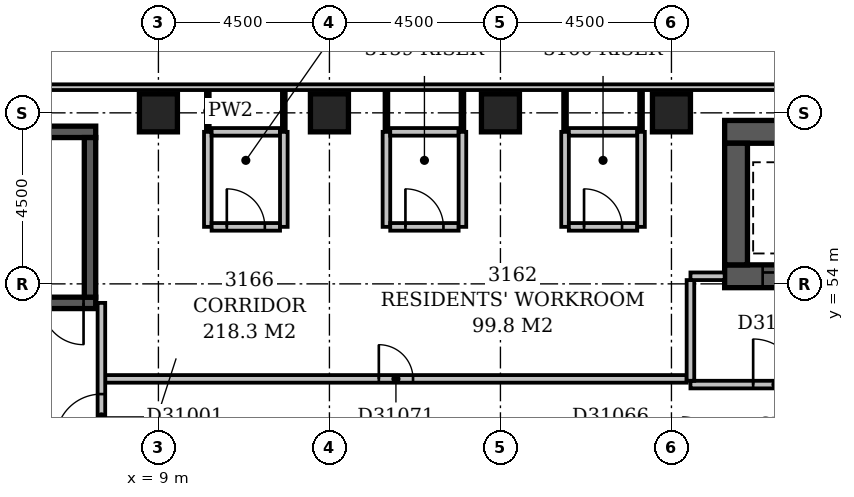
"""IFC4 building model, lengths in metres.
Left out: names, types, materials, properties, quantities, classifications, styles, units other than length and angle.
Written with IfcOpenShell. Run it as: python <this file> out.ifc"""

import sys

from ifc_helpers import new_model, si_unit, direction, frame, frame_2d, origin, origin_2d, place, context, subcontext, project, spatial, rectangle, extrude, element, fill, save


model = new_model("IFC4")
c1 = context("Model", 3, precision=1e-05, world=origin(), true_north=direction((0.0, 1.0)))
c2 = subcontext(c1, "Body", "Model", "MODEL_VIEW")
j1 = project(units=[si_unit("LENGTHUNIT", "METRE"), si_unit("PLANEANGLEUNIT", "RADIAN")], contexts=[c1])
p1 = place(None, origin())
s1 = spatial("IfcSite", under=j1, at=p1, CompositionType="ELEMENT")
p2 = place(p1, origin())
s2 = spatial("IfcBuilding", under=s1, at=p2, CompositionType="ELEMENT")
p3 = place(p2, frame((0.0, 0.0, 126.8)))
s3 = spatial("IfcBuildingStorey", under=s2, at=p3, CompositionType="ELEMENT", Elevation=126.8)
p4 = place(p3, frame((0.35, 53.5, -0.3), z_axis=(0.0, 0.0, 1.0), x_axis=(1.0, 0.0, 0.0)))
e1 = element("IfcWall", 1, at=p4, inside=s3, PredefinedType="SHEAR", context=c2, shape_type="SweptSolid", body=[
    extrude(rectangle(XDim=7.0, YDim=0.3, at=frame_2d((3.5, 0.0))), origin(), (0.0, 0.0, 1.0), 3.6),
])
p5 = place(p4, frame((5.58, 0.0, 0.3)))
e2 = element("IfcOpeningElement", 2, at=p5, cuts=e1, PredefinedType="OPENING", context=c2, shape_type="SweptSolid", body=[
    extrude(rectangle(XDim=1.1, YDim=2.1, at=frame_2d((0.55, 1.05))), frame((0.0, 0.162, 0.0), z_axis=(0.0, -1.0, 0.0), x_axis=(1.0, 0.0, 0.0)), (0.0, 0.0, 1.0), 0.324),
])
p6 = place(p3, frame((0.35, 58.0, -0.3), z_axis=(0.0, 0.0, 1.0), x_axis=(1.0, 0.0, 0.0)))
e3 = element("IfcWall", 3, at=p6, inside=s3, PredefinedType="SHEAR", context=c2, shape_type="SweptSolid", body=[
    extrude(rectangle(XDim=7.0, YDim=0.3, at=frame_2d((3.5, 0.0))), origin(), (0.0, 0.0, 1.0), 3.6),
])
p7 = place(p3, frame((7.2, 53.65, -0.3), z_axis=(0.0, 0.0, 1.0), x_axis=(0.0, 1.0, 0.0)))
e4 = element("IfcWall", 4, at=p7, inside=s3, PredefinedType="SHEAR", context=c2, shape_type="SweptSolid", body=[
    extrude(rectangle(XDim=4.2, YDim=0.3, at=frame_2d((2.1, 0.0))), origin(), (0.0, 0.0, 1.0), 3.6),
])
p8 = place(p3, frame((23.9, 54.2, -0.3), z_axis=(0.0, 0.0, 1.0), x_axis=(1.0, 0.0, 0.0)))
e5 = element("IfcWall", 5, at=p8, inside=s3, PredefinedType="SHEAR", context=c2, shape_type="SweptSolid", body=[
    extrude(rectangle(XDim=3.1, YDim=0.6, at=frame_2d((1.55, 0.0))), origin(), (0.0, 0.0, 1.0), 3.6),
])
p9 = place(p8, frame((1.0, 0.0, 0.3)))
e6 = element("IfcOpeningElement", 6, at=p9, cuts=e5, PredefinedType="OPENING", context=c2, shape_type="SweptSolid", body=[
    extrude(rectangle(XDim=1.1, YDim=2.1, at=frame_2d((0.55, 1.05))), frame((0.0, 0.312, 0.0), z_axis=(0.0, -1.0, 0.0), x_axis=(1.0, 0.0, 0.0)), (0.0, 0.0, 1.0), 0.624),
])
p10 = place(p3, frame((23.9, 58.0, -0.3), z_axis=(0.0, 0.0, 1.0), x_axis=(1.0, 0.0, 0.0)))
e7 = element("IfcWall", 7, at=p10, inside=s3, PredefinedType="SHEAR", context=c2, shape_type="SweptSolid", body=[
    extrude(rectangle(XDim=3.1, YDim=0.6, at=frame_2d((1.55, 0.0))), origin(), (0.0, 0.0, 1.0), 3.6),
])
p11 = place(p3, frame((24.2, 54.5, -0.3), z_axis=(0.0, 0.0, 1.0), x_axis=(0.0, 1.0, 0.0)))
e8 = element("IfcWall", 8, at=p11, inside=s3, PredefinedType="SHEAR", context=c2, shape_type="SweptSolid", body=[
    extrude(rectangle(XDim=3.2, YDim=0.6, at=frame_2d((1.6, 0.0))), origin(), (0.0, 0.0, 1.0), 3.6),
])
for number, where, z_axis, x_axis in (
    (9, (9.0, 58.5, -0.3), (0.0, 0.0, 1.0), (1.0, 0.0, 0.0)),
    (10, (13.5, 58.5, -0.3), (0.0, 0.0, 1.0), (1.0, 0.0, 0.0)),
    (11, (18.0, 58.5, -0.3), (0.0, 0.0, 1.0), (1.0, 0.0, 0.0)),
    (12, (22.5, 58.5, -0.3), (0.0, 0.0, 1.0), (1.0, 0.0, 0.0)),
):
    element("IfcColumn", number, at=place(p3, frame(where, z_axis=z_axis, x_axis=x_axis)), inside=s3, PredefinedType="COLUMN", context=c2, shape_type="SweptSolid", body=[
        extrude(rectangle(XDim=1.0, YDim=1.0, at=origin_2d()), origin(), (0.0, 0.0, 1.0), 3.6),
    ])
p12 = place(p3, frame((68.1, 59.175, 0.0), z_axis=(0.0, 0.0, 1.0), x_axis=(-1.0, 0.0, 0.0)))
e13 = element("IfcWall", 13, at=p12, inside=s3, PredefinedType="STANDARD", context=c2, shape_type="SweptSolid", body=[
    extrude(rectangle(XDim=68.85, YDim=0.15, at=frame_2d((34.425, 0.0))), origin(), (0.0, 0.0, 1.0), 2.7),
])
p13 = place(p12, frame((1.65, 0.0, 0.6)))
e14 = element("IfcOpeningElement", 14, at=p13, cuts=e13, PredefinedType="OPENING", context=c2, shape_type="SweptSolid", body=[
    extrude(rectangle(XDim=2.4, YDim=1.8, at=frame_2d((1.2, 0.9))), frame((0.0, 0.087, 0.0), z_axis=(0.0, -1.0, 0.0), x_axis=(1.0, 0.0, 0.0)), (0.0, 0.0, 1.0), 0.174),
])
p14 = place(p12, frame((5.854, 0.0, 0.6)))
e15 = element("IfcOpeningElement", 15, at=p14, cuts=e13, PredefinedType="OPENING", context=c2, shape_type="SweptSolid", body=[
    extrude(rectangle(XDim=1.5, YDim=1.8, at=frame_2d((0.75, 0.9))), frame((0.0, 0.087, 0.0), z_axis=(0.0, -1.0, 0.0), x_axis=(1.0, 0.0, 0.0)), (0.0, 0.0, 1.0), 0.174),
])
p15 = place(p12, frame((15.15, 0.0, 0.6)))
e16 = element("IfcOpeningElement", 16, at=p15, cuts=e13, PredefinedType="OPENING", context=c2, shape_type="SweptSolid", body=[
    extrude(rectangle(XDim=2.4, YDim=1.8, at=frame_2d((1.2, 0.9))), frame((0.0, 0.087, 0.0), z_axis=(0.0, -1.0, 0.0), x_axis=(1.0, 0.0, 0.0)), (0.0, 0.0, 1.0), 0.174),
])
p16 = place(p12, frame((20.847, 0.0, 0.6)))
e17 = element("IfcOpeningElement", 17, at=p16, cuts=e13, PredefinedType="OPENING", context=c2, shape_type="SweptSolid", body=[
    extrude(rectangle(XDim=1.5, YDim=1.8, at=frame_2d((0.75, 0.9))), frame((0.0, 0.087, 0.0), z_axis=(0.0, -1.0, 0.0), x_axis=(1.0, 0.0, 0.0)), (0.0, 0.0, 1.0), 0.174),
])
p17 = place(p12, frame((37.65, 0.0, 0.6)))
e18 = element("IfcOpeningElement", 18, at=p17, cuts=e13, PredefinedType="OPENING", context=c2, shape_type="SweptSolid", body=[
    extrude(rectangle(XDim=2.4, YDim=1.8, at=frame_2d((1.2, 0.9))), frame((0.0, 0.087, 0.0), z_axis=(0.0, -1.0, 0.0), x_axis=(1.0, 0.0, 0.0)), (0.0, 0.0, 1.0), 0.174),
])
p18 = place(p3, frame((23.0, 51.35, 0.0), z_axis=(0.0, 0.0, 1.0), x_axis=(1.0, 0.0, 0.0)))
e19 = element("IfcWall", 19, at=p18, inside=s3, PredefinedType="PARTITIONING", context=c2, shape_type="SweptSolid", body=[
    extrude(rectangle(XDim=4.8, YDim=0.2, at=frame_2d((2.4, 0.0))), origin(), (0.0, 0.0, 1.0), 3.3),
])
p19 = place(p18, frame((1.65, 0.0, 0.0)))
e20 = element("IfcOpeningElement", 20, at=p19, cuts=e19, PredefinedType="OPENING", context=c2, shape_type="SweptSolid", body=[
    extrude(rectangle(XDim=1.2, YDim=2.1, at=frame_2d((0.6, 1.05))), frame((0.0, 0.112, 0.0), z_axis=(0.0, -1.0, 0.0), x_axis=(1.0, 0.0, 0.0)), (0.0, 0.0, 1.0), 0.224),
])
p20 = place(p3, frame((23.0, 54.2, 0.0), z_axis=(0.0, 0.0, 1.0), x_axis=(1.0, 0.0, 0.0)))
e21 = element("IfcWall", 21, at=p20, inside=s3, PredefinedType="PARTITIONING", context=c2, shape_type="SweptSolid", body=[
    extrude(rectangle(XDim=0.9, YDim=0.2, at=frame_2d((0.45, 0.0))), origin(), (0.0, 0.0, 1.0), 3.3),
])
p21 = place(p3, frame((23.0, 51.45, 0.0), z_axis=(0.0, 0.0, 1.0), x_axis=(0.0, 1.0, 0.0)))
e22 = element("IfcWall", 22, at=p21, inside=s3, PredefinedType="PARTITIONING", context=c2, shape_type="SweptSolid", body=[
    extrude(rectangle(XDim=2.65, YDim=0.2, at=frame_2d((1.325, 0.0))), origin(), (0.0, 0.0, 1.0), 3.3),
])
p22 = place(p3, frame((7.5, 49.6, 0.0), z_axis=(0.0, 0.0, 1.0), x_axis=(0.0, 1.0, 0.0)))
e23 = element("IfcWall", 23, at=p22, inside=s3, PredefinedType="PARTITIONING", context=c2, shape_type="SweptSolid", body=[
    extrude(rectangle(XDim=3.9, YDim=0.2, at=frame_2d((1.95, 0.0))), origin(), (0.0, 0.0, 1.0), 3.3),
])
p23 = place(p22, frame((0.3, 0.0, 0.0)))
e24 = element("IfcOpeningElement", 24, at=p23, cuts=e23, PredefinedType="OPENING", context=c2, shape_type="SweptSolid", body=[
    extrude(rectangle(XDim=1.2, YDim=2.1, at=frame_2d((0.6, 1.05))), frame((0.0, 0.112, 0.0), z_axis=(0.0, -1.0, 0.0), x_axis=(1.0, 0.0, 0.0)), (0.0, 0.0, 1.0), 0.224),
])
p24 = place(p3, frame((7.6, 51.5, 0.0), z_axis=(0.0, 0.0, 1.0), x_axis=(1.0, 0.0, 0.0)))
e25 = element("IfcWall", 25, at=p24, inside=s3, PredefinedType="PARTITIONING", context=c2, shape_type="SweptSolid", body=[
    extrude(rectangle(XDim=15.3, YDim=0.2, at=frame_2d((7.65, 0.0))), origin(), (0.0, 0.0, 1.0), 3.3),
])
p25 = place(p24, frame((7.2, 0.0, 0.0)))
e26 = element("IfcOpeningElement", 26, at=p25, cuts=e25, PredefinedType="OPENING", context=c2, shape_type="SweptSolid", body=[
    extrude(rectangle(XDim=0.9, YDim=2.1, at=frame_2d((0.45, 1.05))), frame((0.0, 0.112, 0.0), z_axis=(0.0, -1.0, 0.0), x_axis=(1.0, 0.0, 0.0)), (0.0, 0.0, 1.0), 0.224),
])
p26 = place(p3, frame((10.3, 55.5, 0.0), z_axis=(0.0, 0.0, 1.0), x_axis=(0.0, 1.0, 0.0)))
e27 = element("IfcWall", 27, at=p26, inside=s3, PredefinedType="PARTITIONING", context=c2, shape_type="SweptSolid", body=[
    extrude(rectangle(XDim=2.5, YDim=0.2, at=frame_2d((1.25, 0.0))), origin(), (0.0, 0.0, 1.0), 3.3),
])
p27 = place(p3, frame((10.4, 55.5, 0.0), z_axis=(0.0, 0.0, 1.0), x_axis=(1.0, 0.0, 0.0)))
e28 = element("IfcWall", 28, at=p27, inside=s3, PredefinedType="PARTITIONING", context=c2, shape_type="SweptSolid", body=[
    extrude(rectangle(XDim=1.8, YDim=0.2, at=frame_2d((0.9, 0.0))), origin(), (0.0, 0.0, 1.0), 3.3),
])
p28 = place(p27, frame((0.4, 0.0, 0.0)))
e29 = element("IfcOpeningElement", 29, at=p28, cuts=e28, PredefinedType="OPENING", context=c2, shape_type="SweptSolid", body=[
    extrude(rectangle(XDim=1.0, YDim=2.1, at=frame_2d((0.5, 1.05))), frame((0.0, 0.112, 0.0), z_axis=(0.0, -1.0, 0.0), x_axis=(1.0, 0.0, 0.0)), (0.0, 0.0, 1.0), 0.224),
])
for number, where, z_axis, x_axis in (
    (30, (12.3, 55.5, 0.0), (0.0, 0.0, 1.0), (0.0, 1.0, 0.0)),
    (31, (15.0, 55.5, 0.0), (0.0, 0.0, 1.0), (0.0, 1.0, 0.0)),
):
    element("IfcWall", number, at=place(p3, frame(where, z_axis=z_axis, x_axis=x_axis)), inside=s3, PredefinedType="PARTITIONING", context=c2, shape_type="SweptSolid", body=[
        extrude(rectangle(XDim=2.5, YDim=0.2, at=frame_2d((1.25, 0.0))), origin(), (0.0, 0.0, 1.0), 3.3),
    ])
p29 = place(p3, frame((15.1, 55.5, 0.0), z_axis=(0.0, 0.0, 1.0), x_axis=(1.0, 0.0, 0.0)))
e32 = element("IfcWall", 32, at=p29, inside=s3, PredefinedType="PARTITIONING", context=c2, shape_type="SweptSolid", body=[
    extrude(rectangle(XDim=1.8, YDim=0.2, at=frame_2d((0.9, 0.0))), origin(), (0.0, 0.0, 1.0), 3.3),
])
p30 = place(p29, frame((0.4, 0.0, 0.0)))
e33 = element("IfcOpeningElement", 33, at=p30, cuts=e32, PredefinedType="OPENING", context=c2, shape_type="SweptSolid", body=[
    extrude(rectangle(XDim=1.0, YDim=2.1, at=frame_2d((0.5, 1.05))), frame((0.0, 0.112, 0.0), z_axis=(0.0, -1.0, 0.0), x_axis=(1.0, 0.0, 0.0)), (0.0, 0.0, 1.0), 0.224),
])
for number, where, z_axis, x_axis in (
    (34, (17.0, 55.5, 0.0), (0.0, 0.0, 1.0), (0.0, 1.0, 0.0)),
    (35, (19.7, 55.5, 0.0), (0.0, 0.0, 1.0), (0.0, 1.0, 0.0)),
):
    element("IfcWall", number, at=place(p3, frame(where, z_axis=z_axis, x_axis=x_axis)), inside=s3, PredefinedType="PARTITIONING", context=c2, shape_type="SweptSolid", body=[
        extrude(rectangle(XDim=2.5, YDim=0.2, at=frame_2d((1.25, 0.0))), origin(), (0.0, 0.0, 1.0), 3.3),
    ])
p31 = place(p3, frame((19.8, 55.5, 0.0), z_axis=(0.0, 0.0, 1.0), x_axis=(1.0, 0.0, 0.0)))
e36 = element("IfcWall", 36, at=p31, inside=s3, PredefinedType="PARTITIONING", context=c2, shape_type="SweptSolid", body=[
    extrude(rectangle(XDim=1.8, YDim=0.2, at=frame_2d((0.9, 0.0))), origin(), (0.0, 0.0, 1.0), 3.3),
])
p32 = place(p31, frame((0.4, 0.0, 0.0)))
e37 = element("IfcOpeningElement", 37, at=p32, cuts=e36, PredefinedType="OPENING", context=c2, shape_type="SweptSolid", body=[
    extrude(rectangle(XDim=1.0, YDim=2.1, at=frame_2d((0.5, 1.05))), frame((0.0, 0.112, 0.0), z_axis=(0.0, -1.0, 0.0), x_axis=(1.0, 0.0, 0.0)), (0.0, 0.0, 1.0), 0.224),
])
p33 = place(p3, frame((21.7, 55.5, 0.0), z_axis=(0.0, 0.0, 1.0), x_axis=(0.0, 1.0, 0.0)))
e38 = element("IfcWall", 38, at=p33, inside=s3, PredefinedType="PARTITIONING", context=c2, shape_type="SweptSolid", body=[
    extrude(rectangle(XDim=2.5, YDim=0.2, at=frame_2d((1.25, 0.0))), origin(), (0.0, 0.0, 1.0), 3.3),
])
p34 = place(p3, frame((10.3, 58.0, 0.0), z_axis=(0.0, 0.0, 1.0), x_axis=(0.0, 1.0, 0.0)))
e39 = element("IfcWall", 39, at=p34, inside=s3, PredefinedType="PARTITIONING", context=c2, shape_type="SweptSolid", body=[
    extrude(rectangle(XDim=1.1, YDim=0.1, at=frame_2d((0.55, 0.0))), origin(), (0.0, 0.0, 1.0), 3.3),
])
p35 = place(p3, frame((10.4, 58.0, 0.0), z_axis=(0.0, 0.0, 1.0), x_axis=(1.0, 0.0, 0.0)))
e40 = element("IfcWall", 40, at=p35, inside=s3, PredefinedType="PARTITIONING", context=c2, shape_type="SweptSolid", body=[
    extrude(rectangle(XDim=1.8, YDim=0.2, at=frame_2d((0.9, 0.0))), origin(), (0.0, 0.0, 1.0), 3.3),
])
for number, where, z_axis, x_axis in (
    (41, (12.3, 58.0, 0.0), (0.0, 0.0, 1.0), (0.0, 1.0, 0.0)),
    (42, (15.0, 58.0, 0.0), (0.0, 0.0, 1.0), (0.0, 1.0, 0.0)),
):
    element("IfcWall", number, at=place(p3, frame(where, z_axis=z_axis, x_axis=x_axis)), inside=s3, PredefinedType="PARTITIONING", context=c2, shape_type="SweptSolid", body=[
        extrude(rectangle(XDim=1.1, YDim=0.1, at=frame_2d((0.55, 0.0))), origin(), (0.0, 0.0, 1.0), 3.3),
    ])
p36 = place(p3, frame((15.1, 58.0, 0.0), z_axis=(0.0, 0.0, 1.0), x_axis=(1.0, 0.0, 0.0)))
e43 = element("IfcWall", 43, at=p36, inside=s3, PredefinedType="PARTITIONING", context=c2, shape_type="SweptSolid", body=[
    extrude(rectangle(XDim=1.8, YDim=0.2, at=frame_2d((0.9, 0.0))), origin(), (0.0, 0.0, 1.0), 3.3),
])
for number, where, z_axis, x_axis in (
    (44, (17.0, 58.0, 0.0), (0.0, 0.0, 1.0), (0.0, 1.0, 0.0)),
    (45, (19.7, 58.0, 0.0), (0.0, 0.0, 1.0), (0.0, 1.0, 0.0)),
):
    element("IfcWall", number, at=place(p3, frame(where, z_axis=z_axis, x_axis=x_axis)), inside=s3, PredefinedType="PARTITIONING", context=c2, shape_type="SweptSolid", body=[
        extrude(rectangle(XDim=1.1, YDim=0.1, at=frame_2d((0.55, 0.0))), origin(), (0.0, 0.0, 1.0), 3.3),
    ])
p37 = place(p3, frame((19.8, 58.0, 0.0), z_axis=(0.0, 0.0, 1.0), x_axis=(1.0, 0.0, 0.0)))
e46 = element("IfcWall", 46, at=p37, inside=s3, PredefinedType="PARTITIONING", context=c2, shape_type="SweptSolid", body=[
    extrude(rectangle(XDim=1.8, YDim=0.2, at=frame_2d((0.9, 0.0))), origin(), (0.0, 0.0, 1.0), 3.3),
])
p38 = place(p3, frame((21.7, 58.0, 0.0), z_axis=(0.0, 0.0, 1.0), x_axis=(0.0, 1.0, 0.0)))
e47 = element("IfcWall", 47, at=p38, inside=s3, PredefinedType="PARTITIONING", context=c2, shape_type="SweptSolid", body=[
    extrude(rectangle(XDim=1.1, YDim=0.1, at=frame_2d((0.55, 0.0))), origin(), (0.0, 0.0, 1.0), 3.3),
])
p39 = place(p23, origin())
e48 = element("IfcDoor", 48, at=p39, inside=s3, OperationType="SINGLE_SWING_LEFT", PredefinedType="DOOR", context=c2, shape_type="SweptSolid", body=[
    extrude(rectangle(XDim=1.2, YDim=2.1, at=frame_2d((0.6, 1.05))), frame((0.0, 0.025, 0.0), z_axis=(0.0, -1.0, 0.0), x_axis=(1.0, 0.0, 0.0)), (0.0, 0.0, 1.0), 0.05),
])
fill(e24, e48)
p40 = place(p19, origin())
e49 = element("IfcDoor", 49, at=p40, inside=s3, OperationType="SINGLE_SWING_LEFT", PredefinedType="DOOR", context=c2, shape_type="SweptSolid", body=[
    extrude(rectangle(XDim=1.2, YDim=2.1, at=frame_2d((0.6, 1.05))), frame((0.0, 0.025, 0.0), z_axis=(0.0, -1.0, 0.0), x_axis=(1.0, 0.0, 0.0)), (0.0, 0.0, 1.0), 0.05),
])
fill(e20, e49)
p41 = place(p9, origin())
e50 = element("IfcDoor", 50, at=p41, inside=s3, OperationType="SLIDING_TO_LEFT", PredefinedType="DOOR", context=c2, shape_type="SweptSolid", body=[
    extrude(rectangle(XDim=1.1, YDim=2.1, at=frame_2d((0.55, 1.05))), frame((0.0, 0.025, 0.0), z_axis=(0.0, -1.0, 0.0), x_axis=(1.0, 0.0, 0.0)), (0.0, 0.0, 1.0), 0.05),
])
fill(e6, e50)
p42 = place(p5, origin())
e51 = element("IfcDoor", 51, at=p42, inside=s3, OperationType="SINGLE_SWING_RIGHT", PredefinedType="DOOR", context=c2, shape_type="SweptSolid", body=[
    extrude(rectangle(XDim=1.1, YDim=2.1, at=frame_2d((0.55, 1.05))), frame((0.0, 0.025, 0.0), z_axis=(0.0, -1.0, 0.0), x_axis=(1.0, 0.0, 0.0)), (0.0, 0.0, 1.0), 0.05),
])
fill(e2, e51)
p43 = place(p25, origin())
e52 = element("IfcDoor", 52, at=p43, inside=s3, OperationType="SINGLE_SWING_LEFT", PredefinedType="DOOR", context=c2, shape_type="SweptSolid", body=[
    extrude(rectangle(XDim=0.9, YDim=2.1, at=frame_2d((0.45, 1.05))), frame((0.0, 0.025, 0.0), z_axis=(0.0, -1.0, 0.0), x_axis=(1.0, 0.0, 0.0)), (0.0, 0.0, 1.0), 0.05),
])
fill(e26, e52)
p44 = place(p28, origin())
e53 = element("IfcDoor", 53, at=p44, inside=s3, OperationType="SINGLE_SWING_LEFT", PredefinedType="DOOR", context=c2, shape_type="SweptSolid", body=[
    extrude(rectangle(XDim=1.0, YDim=2.1, at=frame_2d((0.5, 1.05))), frame((0.0, 0.025, 0.0), z_axis=(0.0, -1.0, 0.0), x_axis=(1.0, 0.0, 0.0)), (0.0, 0.0, 1.0), 0.05),
])
fill(e29, e53)
p45 = place(p30, origin())
e54 = element("IfcDoor", 54, at=p45, inside=s3, OperationType="SINGLE_SWING_LEFT", PredefinedType="DOOR", context=c2, shape_type="SweptSolid", body=[
    extrude(rectangle(XDim=1.0, YDim=2.1, at=frame_2d((0.5, 1.05))), frame((0.0, 0.025, 0.0), z_axis=(0.0, -1.0, 0.0), x_axis=(1.0, 0.0, 0.0)), (0.0, 0.0, 1.0), 0.05),
])
fill(e33, e54)
p46 = place(p32, origin())
e55 = element("IfcDoor", 55, at=p46, inside=s3, OperationType="SINGLE_SWING_LEFT", PredefinedType="DOOR", context=c2, shape_type="SweptSolid", body=[
    extrude(rectangle(XDim=1.0, YDim=2.1, at=frame_2d((0.5, 1.05))), frame((0.0, 0.025, 0.0), z_axis=(0.0, -1.0, 0.0), x_axis=(1.0, 0.0, 0.0)), (0.0, 0.0, 1.0), 0.05),
])
fill(e37, e55)
save(model, sys.argv[1])
